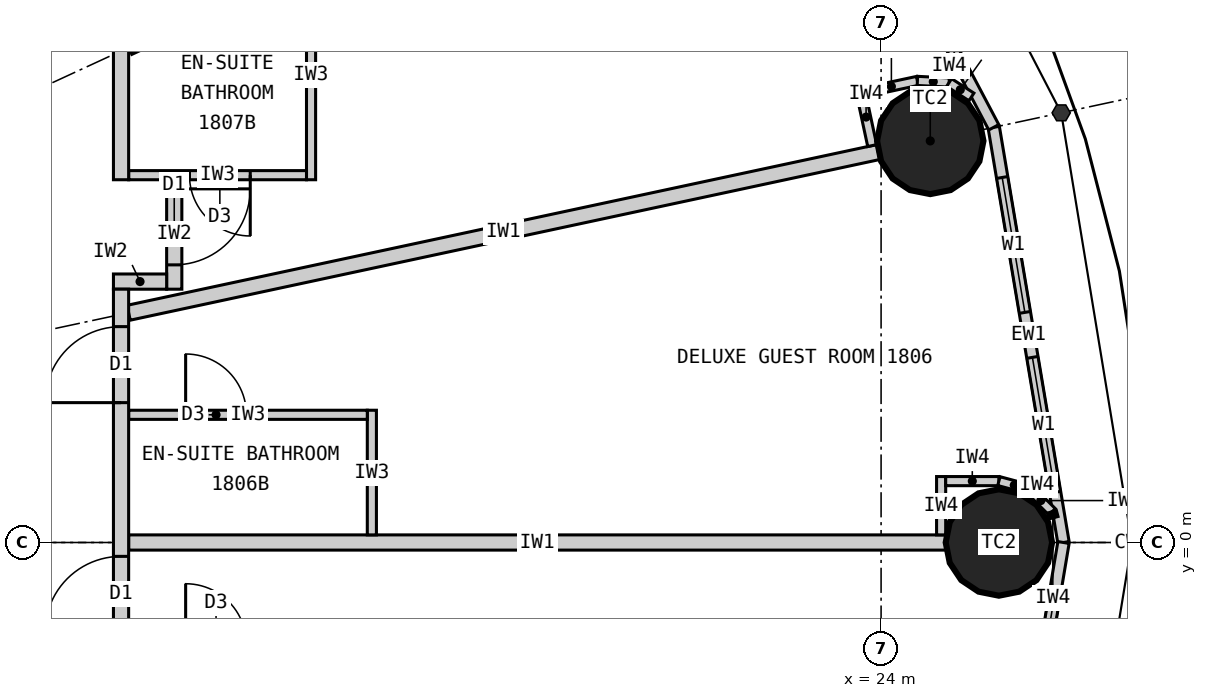
"""IFC4 building model, lengths in metres.
Left out: names, types, materials, properties, quantities, classifications, styles, units other than length and angle.
Written with IfcOpenShell. Run it as: python <this file> out.ifc"""

import sys

from ifc_helpers import new_model, si_unit, direction, frame, frame_2d, origin, origin_2d, place, context, subcontext, project, spatial, rectangle, circle, extrude, element, fill, save


model = new_model("IFC4")
c1 = context("Model", 3, precision=1e-05, world=origin(), true_north=direction((0.0, 1.0)))
c2 = subcontext(c1, "Body", "Model", "MODEL_VIEW")
j1 = project(units=[si_unit("LENGTHUNIT", "METRE"), si_unit("PLANEANGLEUNIT", "RADIAN")], contexts=[c1])
p1 = place(None, origin())
s1 = spatial("IfcSite", under=j1, at=p1, CompositionType="ELEMENT")
p2 = place(p1, origin())
s2 = spatial("IfcBuilding", under=s1, at=p2, CompositionType="ELEMENT")
p3 = place(p2, frame((0.0, 0.0, 73.8)))
s3 = spatial("IfcBuildingStorey", under=s2, at=p3, CompositionType="ELEMENT", Elevation=73.8)
for number, where, z_axis, x_axis in (
    (1, (25.55, 0.0, 0.0), (0.0, 0.0, 1.0), (1.0, 0.0, 0.0)),
    (2, (24.647, 5.283, 0.0), (0.0, 0.0, 1.0), (1.0, 0.0, 0.0)),
):
    element("IfcColumn", number, at=place(p3, frame(where, z_axis=z_axis, x_axis=x_axis)), inside=s3, PredefinedType="COLUMN", context=c2, shape_type="SweptSolid", body=[
        extrude(circle(Radius=0.7, at=origin_2d()), origin(), (0.0, 0.0, 1.0), 3.3),
    ])
p4 = place(p3, frame((26.4, 0.0, 0.0), z_axis=(0.0, 0.0, 1.0), x_axis=(-0.165642551694, 0.986185857264, 0.0)))
e3 = element("IfcWall", 3, at=p4, inside=s3, PredefinedType="ELEMENTEDWALL", context=c2, shape_type="SweptSolid", body=[
    extrude(rectangle(XDim=5.539, YDim=0.15, at=frame_2d((2.77, 0.0))), origin(), (0.0, 0.0, 1.0), 3.12),
])
p5 = place(p4, frame((0.669, 0.0, 0.9)))
e4 = element("IfcOpeningElement", 4, at=p5, cuts=e3, PredefinedType="OPENING", context=c2, shape_type="SweptSolid", body=[
    extrude(rectangle(XDim=1.8, YDim=1.9, at=frame_2d((0.9, 0.95))), frame((0.0, 0.085, 0.0), z_axis=(0.0, -1.0, 0.0), x_axis=(1.0, 0.0, 0.0)), (0.0, 0.0, 1.0), 0.17),
])
p6 = place(p4, frame((3.07, 0.0, 0.9)))
e5 = element("IfcOpeningElement", 5, at=p6, cuts=e3, PredefinedType="OPENING", context=c2, shape_type="SweptSolid", body=[
    extrude(rectangle(XDim=1.8, YDim=1.9, at=frame_2d((0.9, 0.95))), frame((0.0, 0.085, 0.0), z_axis=(0.0, -1.0, 0.0), x_axis=(1.0, 0.0, 0.0)), (0.0, 0.0, 1.0), 0.17),
])
p7 = place(p3, frame((25.482, 5.462, 0.0), z_axis=(0.0, 0.0, 1.0), x_axis=(-0.467296867008, 0.884100468321, 0.0)))
e6 = element("IfcWall", 6, at=p7, inside=s3, PredefinedType="ELEMENTEDWALL", context=c2, shape_type="SweptSolid", body=[
    extrude(rectangle(XDim=5.734, YDim=0.15, at=frame_2d((2.867, 0.0))), origin(), (0.0, 0.0, 1.0), 3.12),
])
p8 = place(p7, frame((0.767, 0.0, 0.9)))
e7 = element("IfcOpeningElement", 7, at=p8, cuts=e6, PredefinedType="OPENING", context=c2, shape_type="SweptSolid", body=[
    extrude(rectangle(XDim=1.8, YDim=1.9, at=frame_2d((0.9, 0.95))), frame((0.0, 0.085, 0.0), z_axis=(0.0, -1.0, 0.0), x_axis=(1.0, 0.0, 0.0)), (0.0, 0.0, 1.0), 0.17),
])
p9 = place(p7, frame((3.167, 0.0, 0.9)))
e8 = element("IfcOpeningElement", 8, at=p9, cuts=e6, PredefinedType="OPENING", context=c2, shape_type="SweptSolid", body=[
    extrude(rectangle(XDim=1.8, YDim=1.9, at=frame_2d((0.9, 0.95))), frame((0.0, 0.085, 0.0), z_axis=(0.0, -1.0, 0.0), x_axis=(1.0, 0.0, 0.0)), (0.0, 0.0, 1.0), 0.17),
])
p10 = place(p3, frame((25.482, -5.462, 0.0), z_axis=(0.0, 0.0, 1.0), x_axis=(0.165642551694, 0.986185857264, 0.0)))
e9 = element("IfcWall", 9, at=p10, inside=s3, PredefinedType="ELEMENTEDWALL", context=c2, shape_type="SweptSolid", body=[
    extrude(rectangle(XDim=5.539, YDim=0.15, at=frame_2d((2.77, 0.0))), origin(), (0.0, 0.0, 1.0), 3.12),
])
p11 = place(p10, frame((0.669, 0.0, 0.9)))
e10 = element("IfcOpeningElement", 10, at=p11, cuts=e9, PredefinedType="OPENING", context=c2, shape_type="SweptSolid", body=[
    extrude(rectangle(XDim=1.8, YDim=1.9, at=frame_2d((0.9, 0.95))), frame((0.0, 0.085, 0.0), z_axis=(0.0, -1.0, 0.0), x_axis=(1.0, 0.0, 0.0)), (0.0, 0.0, 1.0), 0.17),
])
p12 = place(p10, frame((3.07, 0.0, 0.9)))
e11 = element("IfcOpeningElement", 11, at=p12, cuts=e9, PredefinedType="OPENING", context=c2, shape_type="SweptSolid", body=[
    extrude(rectangle(XDim=1.8, YDim=1.9, at=frame_2d((0.9, 0.95))), frame((0.0, 0.085, 0.0), z_axis=(0.0, -1.0, 0.0), x_axis=(1.0, 0.0, 0.0)), (0.0, 0.0, 1.0), 0.17),
])
p13 = place(p3, frame((14.1, 0.0, 0.0), z_axis=(0.0, 0.0, 1.0), x_axis=(1.0, 0.0, 0.0)))
e12 = element("IfcWall", 12, at=p13, inside=s3, PredefinedType="PARTITIONING", context=c2, shape_type="SweptSolid", body=[
    extrude(rectangle(XDim=10.75, YDim=0.2, at=frame_2d((5.375, 0.0))), origin(), (0.0, 0.0, 1.0), 2.27),
])
p14 = place(p3, frame((14.1, 3.022, 0.0), z_axis=(0.0, 0.0, 1.0), x_axis=(0.977790014929, 0.209586943072, 0.0)))
e13 = element("IfcWall", 13, at=p14, inside=s3, PredefinedType="PARTITIONING", context=c2, shape_type="SweptSolid", body=[
    extrude(rectangle(XDim=10.087, YDim=0.2, at=frame_2d((5.043, 0.0))), origin(), (0.0, 0.0, 1.0), 2.32),
])
p15 = place(p3, frame((14.1, 6.512, 0.0), z_axis=(0.0, 0.0, 1.0), x_axis=(0.907832871056, 0.419332181247, 0.0)))
e14 = element("IfcWall", 14, at=p15, inside=s3, PredefinedType="PARTITIONING", context=c2, shape_type="SweptSolid", body=[
    extrude(rectangle(XDim=8.023, YDim=0.2, at=frame_2d((4.011, 0.0))), origin(), (0.0, 0.0, 1.0), 2.32),
])
p16 = place(p3, frame((17.3, 0.1, 0.0), z_axis=(0.0, 0.0, 1.0), x_axis=(0.0, 1.0, 0.0)))
e15 = element("IfcWall", 15, at=p16, inside=s3, PredefinedType="PARTITIONING", context=c2, shape_type="SweptSolid", body=[
    extrude(rectangle(XDim=1.64, YDim=0.12, at=frame_2d((0.82, 0.0))), origin(), (0.0, 0.0, 1.0), 3.12),
])
p17 = place(p3, frame((14.1, 1.68, 0.0), z_axis=(0.0, 0.0, 1.0), x_axis=(1.0, 0.0, 0.0)))
e16 = element("IfcWall", 16, at=p17, inside=s3, PredefinedType="PARTITIONING", context=c2, shape_type="SweptSolid", body=[
    extrude(rectangle(XDim=3.14, YDim=0.12, at=frame_2d((1.57, 0.0))), origin(), (0.0, 0.0, 1.0), 3.12),
])
p18 = place(p17, frame((0.75, 0.0, 0.0)))
e17 = element("IfcOpeningElement", 17, at=p18, cuts=e16, PredefinedType="OPENING", context=c2, shape_type="SweptSolid", body=[
    extrude(rectangle(XDim=0.8, YDim=2.1, at=frame_2d((0.4, 1.05))), frame((0.0, 0.07, 0.0), z_axis=(0.0, -1.0, 0.0), x_axis=(1.0, 0.0, 0.0)), (0.0, 0.0, 1.0), 0.14),
])
p19 = place(p3, frame((16.5, 7.521, 0.0), z_axis=(0.0, 0.0, 1.0), x_axis=(0.0, -1.0, 0.0)))
e18 = element("IfcWall", 18, at=p19, inside=s3, PredefinedType="PARTITIONING", context=c2, shape_type="SweptSolid", body=[
    extrude(rectangle(XDim=2.749, YDim=0.12, at=frame_2d((1.374, 0.0))), origin(), (0.0, 0.0, 1.0), 3.12),
])
p20 = place(p3, frame((14.1, 4.833, 0.0), z_axis=(0.0, 0.0, 1.0), x_axis=(1.0, 0.0, 0.0)))
e19 = element("IfcWall", 19, at=p20, inside=s3, PredefinedType="PARTITIONING", context=c2, shape_type="SweptSolid", body=[
    extrude(rectangle(XDim=2.34, YDim=0.12, at=frame_2d((1.17, 0.0))), origin(), (0.0, 0.0, 1.0), 3.12),
])
p21 = place(p20, frame((0.8, 0.0, 0.0)))
e20 = element("IfcOpeningElement", 20, at=p21, cuts=e19, PredefinedType="OPENING", context=c2, shape_type="SweptSolid", body=[
    extrude(rectangle(XDim=0.8, YDim=2.1, at=frame_2d((0.4, 1.05))), frame((0.0, 0.07, 0.0), z_axis=(0.0, -1.0, 0.0), x_axis=(1.0, 0.0, 0.0)), (0.0, 0.0, 1.0), 0.14),
])
p22 = place(p3, frame((14.7, 3.333, 0.0), z_axis=(0.0, 0.0, 1.0), x_axis=(0.0, 1.0, 0.0)))
e21 = element("IfcWall", 21, at=p22, inside=s3, PredefinedType="PARTITIONING", context=c2, shape_type="SweptSolid", body=[
    extrude(rectangle(XDim=1.44, YDim=0.2, at=frame_2d((0.72, 0.0))), origin(), (0.0, 0.0, 1.0), 3.12),
])
p23 = place(p22, frame((0.32, 0.0, 0.0)))
e22 = element("IfcOpeningElement", 22, at=p23, cuts=e21, PredefinedType="OPENING", context=c2, shape_type="SweptSolid", body=[
    extrude(rectangle(XDim=1.0, YDim=2.2, at=frame_2d((0.5, 1.1))), frame((0.0, 0.11, 0.0), z_axis=(0.0, -1.0, 0.0), x_axis=(1.0, 0.0, 0.0)), (0.0, 0.0, 1.0), 0.22),
])
p24 = place(p3, frame((13.9, 3.433, 0.0), z_axis=(0.0, 0.0, 1.0), x_axis=(1.0, 0.0, 0.0)))
e23 = element("IfcWall", 23, at=p24, inside=s3, PredefinedType="PARTITIONING", context=c2, shape_type="SweptSolid", body=[
    extrude(rectangle(XDim=0.7, YDim=0.2, at=frame_2d((0.35, 0.0))), origin(), (0.0, 0.0, 1.0), 2.32),
])
p25 = place(p3, frame((14.0, -9.9, 0.0), z_axis=(0.0, 0.0, 1.0), x_axis=(0.0, 1.0, 0.0)))
e24 = element("IfcWall", 24, at=p25, inside=s3, PredefinedType="PARTITIONING", context=c2, shape_type="SweptSolid", body=[
    extrude(rectangle(XDim=13.232, YDim=0.2, at=frame_2d((6.616, 0.0))), origin(), (0.0, 0.0, 1.0), 3.12),
])
p26 = place(p25, frame((4.948, 0.0, 0.0)))
e25 = element("IfcOpeningElement", 25, at=p26, cuts=e24, PredefinedType="OPENING", context=c2, shape_type="SweptSolid", body=[
    extrude(rectangle(XDim=1.0, YDim=2.2, at=frame_2d((0.5, 1.1))), frame((0.0, 0.11, 0.0), z_axis=(0.0, -1.0, 0.0), x_axis=(1.0, 0.0, 0.0)), (0.0, 0.0, 1.0), 0.22),
])
p27 = place(p25, frame((8.718, 0.0, 0.0)))
e26 = element("IfcOpeningElement", 26, at=p27, cuts=e24, PredefinedType="OPENING", context=c2, shape_type="SweptSolid", body=[
    extrude(rectangle(XDim=1.0, YDim=2.2, at=frame_2d((0.5, 1.1))), frame((0.0, 0.11, 0.0), z_axis=(0.0, -1.0, 0.0), x_axis=(1.0, 0.0, 0.0)), (0.0, 0.0, 1.0), 0.22),
])
p28 = place(p25, frame((11.74, 0.0, 0.0)))
e27 = element("IfcOpeningElement", 27, at=p28, cuts=e24, PredefinedType="OPENING", context=c2, shape_type="SweptSolid", body=[
    extrude(rectangle(XDim=1.0, YDim=2.2, at=frame_2d((0.5, 1.1))), frame((0.0, 0.11, 0.0), z_axis=(0.0, -1.0, 0.0), x_axis=(1.0, 0.0, 0.0)), (0.0, 0.0, 1.0), 0.22),
])
p29 = place(p3, frame((14.0, 4.772, 0.0), z_axis=(0.0, 0.0, 1.0), x_axis=(0.0, 1.0, 0.0)))
e28 = element("IfcWall", 28, at=p29, inside=s3, PredefinedType="PARTITIONING", context=c2, shape_type="SweptSolid", body=[
    extrude(rectangle(XDim=5.127, YDim=0.2, at=frame_2d((2.564, 0.0))), origin(), (0.0, 0.0, 1.0), 3.12),
])
p30 = place(p29, frame((4.025, 0.0, 0.0)))
e29 = element("IfcOpeningElement", 29, at=p30, cuts=e28, PredefinedType="OPENING", context=c2, shape_type="SweptSolid", body=[
    extrude(rectangle(XDim=1.0, YDim=2.2, at=frame_2d((0.5, 1.1))), frame((0.0, 0.11, 0.0), z_axis=(0.0, -1.0, 0.0), x_axis=(1.0, 0.0, 0.0)), (0.0, 0.0, 1.0), 0.22),
])
p31 = place(p3, frame((24.79, 0.1, 0.0), z_axis=(0.0, 0.0, 1.0), x_axis=(0.0, 1.0, 0.0)))
e30 = element("IfcWall", 30, at=p31, inside=s3, PredefinedType="PARTITIONING", context=c2, shape_type="SweptSolid", body=[
    extrude(rectangle(XDim=0.767, YDim=0.12, at=frame_2d((0.384, 0.0))), origin(), (0.0, 0.0, 1.0), 3.12),
])
p32 = place(p3, frame((24.85, 0.808, 0.0), z_axis=(0.0, 0.0, 1.0), x_axis=(1.0, 0.0, 0.0)))
e31 = element("IfcWall", 31, at=p32, inside=s3, PredefinedType="PARTITIONING", context=c2, shape_type="SweptSolid", body=[
    extrude(rectangle(XDim=0.7, YDim=0.12, at=frame_2d((0.35, 0.0))), origin(), (0.0, 0.0, 1.0), 3.12),
])
p33 = place(p3, frame((25.55, 0.808, 0.0), z_axis=(0.0, 0.0, 1.0), x_axis=(0.965807183573, -0.2592614205, 0.0)))
e32 = element("IfcWall", 32, at=p33, inside=s3, PredefinedType="PARTITIONING", context=c2, shape_type="SweptSolid", body=[
    extrude(rectangle(XDim=0.418, YDim=0.12, at=frame_2d((0.209, 0.0))), origin(), (0.0, 0.0, 1.0), 3.12),
])
p34 = place(p3, frame((25.954, 0.699, 0.0), z_axis=(0.0, 0.0, 1.0), x_axis=(0.707106781187, -0.707106781187, 0.0)))
e33 = element("IfcWall", 33, at=p34, inside=s3, PredefinedType="PARTITIONING", context=c2, shape_type="SweptSolid", body=[
    extrude(rectangle(XDim=0.418, YDim=0.12, at=frame_2d((0.209, 0.0))), origin(), (0.0, 0.0, 1.0), 3.12),
])
p35 = place(p3, frame((26.249, 0.404, 0.0), z_axis=(0.0, 0.0, 1.0), x_axis=(0.259754282609, -0.965674744759, 0.0)))
e34 = element("IfcWall", 34, at=p35, inside=s3, PredefinedType="PARTITIONING", context=c2, shape_type="SweptSolid", body=[
    extrude(rectangle(XDim=0.08, YDim=0.12, at=frame_2d((0.04, 0.0))), origin(), (0.0, 0.0, 1.0), 3.12),
])
p36 = place(p3, frame((23.883, 5.222, 0.0), z_axis=(0.0, 0.0, 1.0), x_axis=(-0.209311842415, 0.977848941619, 0.0)))
e35 = element("IfcWall", 35, at=p36, inside=s3, PredefinedType="PARTITIONING", context=c2, shape_type="SweptSolid", body=[
    extrude(rectangle(XDim=0.768, YDim=0.12, at=frame_2d((0.384, 0.0))), origin(), (0.0, 0.0, 1.0), 3.12),
])
p37 = place(p3, frame((23.793, 5.926, 0.0), z_axis=(0.0, 0.0, 1.0), x_axis=(0.977792206673, 0.209576717621, 0.0)))
e36 = element("IfcWall", 36, at=p37, inside=s3, PredefinedType="PARTITIONING", context=c2, shape_type="SweptSolid", body=[
    extrude(rectangle(XDim=0.7, YDim=0.12, at=frame_2d((0.35, 0.0))), origin(), (0.0, 0.0, 1.0), 3.12),
])
p38 = place(p3, frame((24.478, 6.073, 0.0), z_axis=(0.0, 0.0, 1.0), x_axis=(0.998708262812, -0.05081147302, 0.0)))
e37 = element("IfcWall", 37, at=p38, inside=s3, PredefinedType="PARTITIONING", context=c2, shape_type="SweptSolid", body=[
    extrude(rectangle(XDim=0.418, YDim=0.12, at=frame_2d((0.209, 0.0))), origin(), (0.0, 0.0, 1.0), 3.12),
])
p39 = place(p3, frame((24.895, 6.052, 0.0), z_axis=(0.0, 0.0, 1.0), x_axis=(0.839495197275, -0.54336710772, 0.0)))
e38 = element("IfcWall", 38, at=p39, inside=s3, PredefinedType="PARTITIONING", context=c2, shape_type="SweptSolid", body=[
    extrude(rectangle(XDim=0.35, YDim=0.12, at=frame_2d((0.175, 0.0))), origin(), (0.0, 0.0, 1.0), 3.12),
])
p40 = place(p5, origin())
e39 = element("IfcWindow", 39, at=p40, inside=s3, PartitioningType="SINGLE_PANEL", PredefinedType="WINDOW", context=c2, shape_type="SweptSolid", body=[
    extrude(rectangle(XDim=1.8, YDim=1.9, at=frame_2d((0.9, 0.95))), frame((0.0, 0.03, 0.0), z_axis=(0.0, -1.0, 0.0), x_axis=(1.0, 0.0, 0.0)), (0.0, 0.0, 1.0), 0.06),
])
fill(e4, e39)
p41 = place(p6, origin())
e40 = element("IfcWindow", 40, at=p41, inside=s3, PartitioningType="SINGLE_PANEL", PredefinedType="WINDOW", context=c2, shape_type="SweptSolid", body=[
    extrude(rectangle(XDim=1.8, YDim=1.9, at=frame_2d((0.9, 0.95))), frame((0.0, 0.03, 0.0), z_axis=(0.0, -1.0, 0.0), x_axis=(1.0, 0.0, 0.0)), (0.0, 0.0, 1.0), 0.06),
])
fill(e5, e40)
p42 = place(p8, origin())
e41 = element("IfcWindow", 41, at=p42, inside=s3, PartitioningType="SINGLE_PANEL", PredefinedType="WINDOW", context=c2, shape_type="SweptSolid", body=[
    extrude(rectangle(XDim=1.8, YDim=1.9, at=frame_2d((0.9, 0.95))), frame((0.0, 0.03, 0.0), z_axis=(0.0, -1.0, 0.0), x_axis=(1.0, 0.0, 0.0)), (0.0, 0.0, 1.0), 0.06),
])
fill(e7, e41)
p43 = place(p12, origin())
e42 = element("IfcWindow", 42, at=p43, inside=s3, PartitioningType="SINGLE_PANEL", PredefinedType="WINDOW", context=c2, shape_type="SweptSolid", body=[
    extrude(rectangle(XDim=1.8, YDim=1.9, at=frame_2d((0.9, 0.95))), frame((0.0, 0.03, 0.0), z_axis=(0.0, -1.0, 0.0), x_axis=(1.0, 0.0, 0.0)), (0.0, 0.0, 1.0), 0.06),
])
fill(e11, e42)
p44 = place(p27, origin())
e43 = element("IfcDoor", 43, at=p44, inside=s3, OperationType="SINGLE_SWING_LEFT", PredefinedType="DOOR", context=c2, shape_type="SweptSolid", body=[
    extrude(rectangle(XDim=1.0, YDim=2.2, at=frame_2d((0.5, 1.1))), frame((0.0, 0.025, 0.0), z_axis=(0.0, -1.0, 0.0), x_axis=(1.0, 0.0, 0.0)), (0.0, 0.0, 1.0), 0.05),
])
fill(e26, e43)
p45 = place(p18, origin())
e44 = element("IfcDoor", 44, at=p45, inside=s3, OperationType="SINGLE_SWING_LEFT", PredefinedType="DOOR", context=c2, shape_type="SweptSolid", body=[
    extrude(rectangle(XDim=0.8, YDim=2.1, at=frame_2d((0.4, 1.05))), frame((0.0, 0.025, 0.0), z_axis=(0.0, -1.0, 0.0), x_axis=(1.0, 0.0, 0.0)), (0.0, 0.0, 1.0), 0.05),
])
fill(e17, e44)
p46 = place(p28, origin())
e45 = element("IfcDoor", 45, at=p46, inside=s3, OperationType="SINGLE_SWING_LEFT", PredefinedType="DOOR", context=c2, shape_type="SweptSolid", body=[
    extrude(rectangle(XDim=1.0, YDim=2.2, at=frame_2d((0.5, 1.1))), frame((0.0, 0.025, 0.0), z_axis=(0.0, -1.0, 0.0), x_axis=(1.0, 0.0, 0.0)), (0.0, 0.0, 1.0), 0.05),
])
fill(e27, e45)
p47 = place(p21, origin())
e46 = element("IfcDoor", 46, at=p47, inside=s3, OperationType="SINGLE_SWING_RIGHT", PredefinedType="DOOR", context=c2, shape_type="SweptSolid", body=[
    extrude(rectangle(XDim=0.8, YDim=2.1, at=frame_2d((0.4, 1.05))), frame((0.0, 0.025, 0.0), z_axis=(0.0, -1.0, 0.0), x_axis=(1.0, 0.0, 0.0)), (0.0, 0.0, 1.0), 0.05),
])
fill(e20, e46)
p48 = place(p23, origin())
e47 = element("IfcDoor", 47, at=p48, inside=s3, OperationType="SINGLE_SWING_RIGHT", PredefinedType="DOOR", context=c2, shape_type="SweptSolid", body=[
    extrude(rectangle(XDim=1.0, YDim=2.2, at=frame_2d((0.5, 1.1))), frame((0.0, 0.025, 0.0), z_axis=(0.0, -1.0, 0.0), x_axis=(1.0, 0.0, 0.0)), (0.0, 0.0, 1.0), 0.05),
])
fill(e22, e47)
save(model, sys.argv[1])
